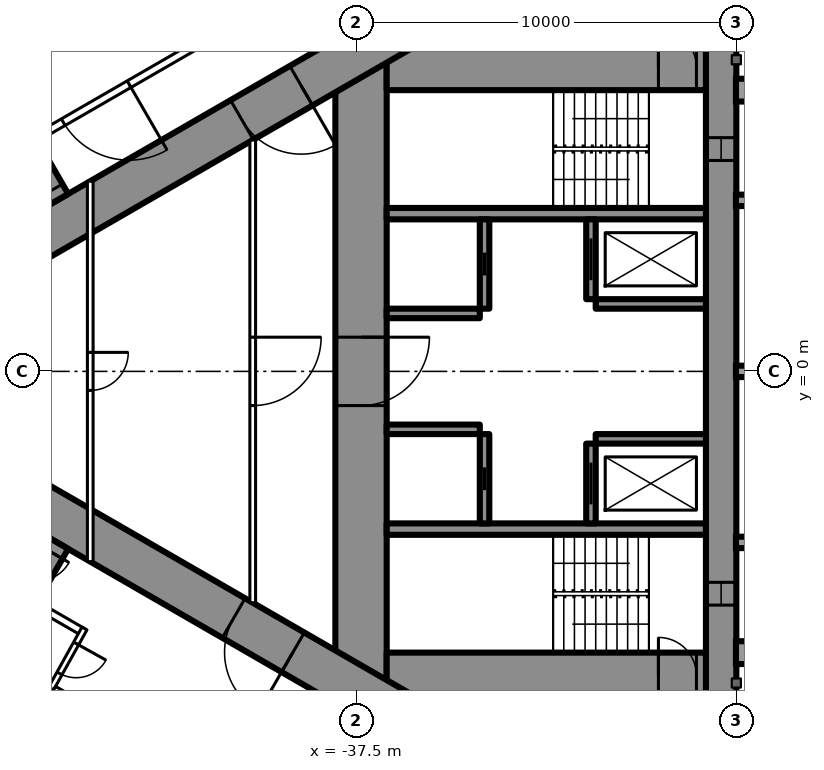
"""IFC4 building model, lengths in metres.
Left out: names, types, materials, properties, quantities, classifications, styles, units other than length and angle.
Written with IfcOpenShell. Run it as: python <this file> out.ifc"""

import sys

from ifc_helpers import new_model, si_unit, direction, frame, frame_2d, origin, place, context, subcontext, project, spatial, rectangle, extrude, element, fill, save


model = new_model("IFC4")
c1 = context("Model", 3, precision=1e-05, world=origin(), true_north=direction((0.0, 1.0)))
c2 = subcontext(c1, "Body", "Model", "MODEL_VIEW")
j1 = project(units=[si_unit("LENGTHUNIT", "METRE"), si_unit("PLANEANGLEUNIT", "RADIAN")], contexts=[c1])
p1 = place(None, origin())
s1 = spatial("IfcSite", under=j1, at=p1, CompositionType="ELEMENT")
p2 = place(p1, origin())
s2 = spatial("IfcBuilding", under=s1, at=p2, CompositionType="ELEMENT")
p3 = place(p2, frame((0.0, 0.0, 152.7)))
s3 = spatial("IfcBuildingStorey", under=s2, at=p3, CompositionType="ELEMENT", Elevation=152.7)
p4 = place(p3, frame((-27.9, 8.6, 0.0), z_axis=(0.0, 0.0, 1.0), x_axis=(0.0, -1.0, 0.0)))
e1 = element("IfcWall", 1, at=p4, inside=s3, PredefinedType="SHEAR", context=c2, shape_type="SweptSolid", body=[
    extrude(rectangle(XDim=17.2, YDim=0.8, at=frame_2d((8.6, 0.0))), origin(), (0.0, 0.0, 1.0), 3.6),
])
p5 = place(p4, frame((2.45, 0.0, 0.6)))
e2 = element("IfcOpeningElement", 2, at=p5, cuts=e1, PredefinedType="OPENING", context=c2, shape_type="SweptSolid", body=[
    extrude(rectangle(XDim=0.6, YDim=2.1, at=frame_2d((0.3, 1.05))), frame((0.0, 0.41, 0.0), z_axis=(0.0, -1.0, 0.0), x_axis=(1.0, 0.0, 0.0)), (0.0, 0.0, 1.0), 0.82),
])
p6 = place(p4, frame((14.15, 0.0, 0.6)))
e3 = element("IfcOpeningElement", 3, at=p6, cuts=e1, PredefinedType="OPENING", context=c2, shape_type="SweptSolid", body=[
    extrude(rectangle(XDim=0.6, YDim=2.1, at=frame_2d((0.3, 1.05))), frame((0.0, 0.41, 0.0), z_axis=(0.0, -1.0, 0.0), x_axis=(1.0, 0.0, 0.0)), (0.0, 0.0, 1.0), 0.82),
])
p7 = place(p3, frame((-37.375, 8.6, 0.0), z_axis=(0.0, 0.0, 1.0), x_axis=(0.0, -1.0, 0.0)))
e4 = element("IfcWall", 4, at=p7, inside=s3, PredefinedType="SHEAR", context=c2, shape_type="SweptSolid", body=[
    extrude(rectangle(XDim=17.2, YDim=1.35, at=frame_2d((8.6, 0.0))), origin(), (0.0, 0.0, 1.0), 3.6),
])
p8 = place(p7, frame((7.7, 0.0, 0.0)))
e5 = element("IfcOpeningElement", 5, at=p8, cuts=e4, PredefinedType="OPENING", context=c2, shape_type="SweptSolid", body=[
    extrude(rectangle(XDim=1.8, YDim=2.2, at=frame_2d((0.9, 1.1))), frame((0.0, 0.685, 0.0), z_axis=(0.0, -1.0, 0.0), x_axis=(1.0, 0.0, 0.0)), (0.0, 0.0, 1.0), 1.37),
])
p9 = place(p3, frame((-28.3, 8.0, 0.0), z_axis=(0.0, 0.0, 1.0), x_axis=(-1.0, 0.0, 0.0)))
e6 = element("IfcWall", 6, at=p9, inside=s3, PredefinedType="SHEAR", context=c2, shape_type="SweptSolid", body=[
    extrude(rectangle(XDim=8.4, YDim=1.2, at=frame_2d((4.2, 0.0))), origin(), (0.0, 0.0, 1.0), 3.6),
])
p10 = place(p9, frame((0.25, 0.0, 0.0)))
e7 = element("IfcOpeningElement", 7, at=p10, cuts=e6, PredefinedType="OPENING", context=c2, shape_type="SweptSolid", body=[
    extrude(rectangle(XDim=1.0, YDim=2.2, at=frame_2d((0.5, 1.1))), frame((0.0, 0.61, 0.0), z_axis=(0.0, -1.0, 0.0), x_axis=(1.0, 0.0, 0.0)), (0.0, 0.0, 1.0), 1.22),
])
p11 = place(p3, frame((-28.3, -8.0, 0.0), z_axis=(0.0, 0.0, 1.0), x_axis=(-1.0, 0.0, 0.0)))
e8 = element("IfcWall", 8, at=p11, inside=s3, PredefinedType="SHEAR", context=c2, shape_type="SweptSolid", body=[
    extrude(rectangle(XDim=8.4, YDim=1.2, at=frame_2d((4.2, 0.0))), origin(), (0.0, 0.0, 1.0), 3.6),
])
p12 = place(p11, frame((0.25, 0.0, 0.0)))
e9 = element("IfcOpeningElement", 9, at=p12, cuts=e8, PredefinedType="OPENING", context=c2, shape_type="SweptSolid", body=[
    extrude(rectangle(XDim=1.0, YDim=2.2, at=frame_2d((0.5, 1.1))), frame((0.0, 0.61, 0.0), z_axis=(0.0, -1.0, 0.0), x_axis=(1.0, 0.0, 0.0)), (0.0, 0.0, 1.0), 1.22),
])
for number, where, z_axis, x_axis in (
    (10, (-28.3, 4.15, 0.0), (0.0, 0.0, 1.0), (-1.0, 0.0, 0.0)),
    (11, (-28.3, -4.15, 0.0), (0.0, 0.0, 1.0), (-1.0, 0.0, 0.0)),
):
    element("IfcWall", number, at=place(p3, frame(where, z_axis=z_axis, x_axis=x_axis)), inside=s3, PredefinedType="SHEAR", context=c2, shape_type="SweptSolid", body=[
        extrude(rectangle(XDim=8.4, YDim=0.3, at=frame_2d((4.2, 0.0))), origin(), (0.0, 0.0, 1.0), 3.6),
    ])
p13 = place(p3, frame((-31.325, 4.0, 0.0), z_axis=(0.0, 0.0, 1.0), x_axis=(0.0, -1.0, 0.0)))
e12 = element("IfcWall", 12, at=p13, inside=s3, PredefinedType="SHEAR", context=c2, shape_type="SweptSolid", body=[
    extrude(rectangle(XDim=2.1, YDim=0.25, at=frame_2d((1.05, 0.0))), origin(), (0.0, 0.0, 1.0), 3.6),
])
p14 = place(p13, frame((0.5, 0.0, 0.0)))
e13 = element("IfcOpeningElement", 13, at=p14, cuts=e12, PredefinedType="OPENING", context=c2, shape_type="SweptSolid", body=[
    extrude(rectangle(XDim=1.1, YDim=2.2, at=frame_2d((0.55, 1.1))), frame((0.0, 0.135, 0.0), z_axis=(0.0, -1.0, 0.0), x_axis=(1.0, 0.0, 0.0)), (0.0, 0.0, 1.0), 0.27),
])
p15 = place(p3, frame((-34.125, 4.0, 0.0), z_axis=(0.0, 0.0, 1.0), x_axis=(0.0, -1.0, 0.0)))
e14 = element("IfcWall", 14, at=p15, inside=s3, PredefinedType="SHEAR", context=c2, shape_type="SweptSolid", body=[
    extrude(rectangle(XDim=2.35, YDim=0.25, at=frame_2d((1.175, 0.0))), origin(), (0.0, 0.0, 1.0), 3.6),
])
p16 = place(p15, frame((0.875, 0.0, 0.0)))
e15 = element("IfcOpeningElement", 15, at=p16, cuts=e14, PredefinedType="OPENING", context=c2, shape_type="SweptSolid", body=[
    extrude(rectangle(XDim=0.6, YDim=2.0, at=frame_2d((0.3, 1.0))), frame((0.0, 0.135, 0.0), z_axis=(0.0, -1.0, 0.0), x_axis=(1.0, 0.0, 0.0)), (0.0, 0.0, 1.0), 0.27),
])
p17 = place(p3, frame((-28.3, 1.775, 0.0), z_axis=(0.0, 0.0, 1.0), x_axis=(-1.0, 0.0, 0.0)))
e16 = element("IfcWall", 16, at=p17, inside=s3, PredefinedType="SHEAR", context=c2, shape_type="SweptSolid", body=[
    extrude(rectangle(XDim=2.9, YDim=0.25, at=frame_2d((1.45, 0.0))), origin(), (0.0, 0.0, 1.0), 3.6),
])
p18 = place(p3, frame((-34.25, 1.525, 0.0), z_axis=(0.0, 0.0, 1.0), x_axis=(-1.0, 0.0, 0.0)))
e17 = element("IfcWall", 17, at=p18, inside=s3, PredefinedType="SHEAR", context=c2, shape_type="SweptSolid", body=[
    extrude(rectangle(XDim=2.45, YDim=0.25, at=frame_2d((1.225, 0.0))), origin(), (0.0, 0.0, 1.0), 3.6),
])
p19 = place(p3, frame((-31.325, -1.9, 0.0), z_axis=(0.0, 0.0, 1.0), x_axis=(0.0, -1.0, 0.0)))
e18 = element("IfcWall", 18, at=p19, inside=s3, PredefinedType="SHEAR", context=c2, shape_type="SweptSolid", body=[
    extrude(rectangle(XDim=2.1, YDim=0.25, at=frame_2d((1.05, 0.0))), origin(), (0.0, 0.0, 1.0), 3.6),
])
p20 = place(p19, frame((0.5, 0.0, 0.0)))
e19 = element("IfcOpeningElement", 19, at=p20, cuts=e18, PredefinedType="OPENING", context=c2, shape_type="SweptSolid", body=[
    extrude(rectangle(XDim=1.1, YDim=2.2, at=frame_2d((0.55, 1.1))), frame((0.0, 0.135, 0.0), z_axis=(0.0, -1.0, 0.0), x_axis=(1.0, 0.0, 0.0)), (0.0, 0.0, 1.0), 0.27),
])
p21 = place(p3, frame((-34.125, -1.65, 0.0), z_axis=(0.0, 0.0, 1.0), x_axis=(0.0, -1.0, 0.0)))
e20 = element("IfcWall", 20, at=p21, inside=s3, PredefinedType="SHEAR", context=c2, shape_type="SweptSolid", body=[
    extrude(rectangle(XDim=2.35, YDim=0.25, at=frame_2d((1.175, 0.0))), origin(), (0.0, 0.0, 1.0), 3.6),
])
p22 = place(p21, frame((0.875, 0.0, 0.0)))
e21 = element("IfcOpeningElement", 21, at=p22, cuts=e20, PredefinedType="OPENING", context=c2, shape_type="SweptSolid", body=[
    extrude(rectangle(XDim=0.6, YDim=2.0, at=frame_2d((0.3, 1.0))), frame((0.0, 0.135, 0.0), z_axis=(0.0, -1.0, 0.0), x_axis=(1.0, 0.0, 0.0)), (0.0, 0.0, 1.0), 0.27),
])
p23 = place(p3, frame((-28.3, -1.775, 0.0), z_axis=(0.0, 0.0, 1.0), x_axis=(-1.0, 0.0, 0.0)))
e22 = element("IfcWall", 22, at=p23, inside=s3, PredefinedType="SHEAR", context=c2, shape_type="SweptSolid", body=[
    extrude(rectangle(XDim=2.9, YDim=0.25, at=frame_2d((1.45, 0.0))), origin(), (0.0, 0.0, 1.0), 3.6),
])
p24 = place(p3, frame((-34.25, -1.525, 0.0), z_axis=(0.0, 0.0, 1.0), x_axis=(-1.0, 0.0, 0.0)))
e23 = element("IfcWall", 23, at=p24, inside=s3, PredefinedType="SHEAR", context=c2, shape_type="SweptSolid", body=[
    extrude(rectangle(XDim=2.45, YDim=0.25, at=frame_2d((1.225, 0.0))), origin(), (0.0, 0.0, 1.0), 3.6),
])
p25 = place(p3, frame((-27.2, 14.3, 0.0), z_axis=(0.0, 0.0, 1.0), x_axis=(-0.866026593062, -0.499997940104, 0.0)))
e24 = element("IfcWall", 24, at=p25, inside=s3, PredefinedType="SHEAR", context=c2, shape_type="SweptSolid", body=[
    extrude(rectangle(XDim=28.946, YDim=1.2, at=frame_2d((14.473, 0.0))), origin(), (0.0, 0.0, 1.0), 3.6),
])
p26 = place(p25, frame((4.6, 0.0, 0.0)))
e25 = element("IfcOpeningElement", 25, at=p26, cuts=e24, PredefinedType="OPENING", context=c2, shape_type="SweptSolid", body=[
    extrude(rectangle(XDim=1.0, YDim=2.2, at=frame_2d((0.5, 1.1))), frame((0.0, 0.61, 0.0), z_axis=(0.0, -1.0, 0.0), x_axis=(1.0, 0.0, 0.0)), (0.0, 0.0, 1.0), 1.22),
])
p27 = place(p25, frame((13.568, 0.0, 0.0)))
e26 = element("IfcOpeningElement", 26, at=p27, cuts=e24, PredefinedType="OPENING", context=c2, shape_type="SweptSolid", body=[
    extrude(rectangle(XDim=1.8, YDim=2.04, at=frame_2d((0.9, 1.02))), frame((0.0, 0.61, 0.0), z_axis=(0.0, -1.0, 0.0), x_axis=(1.0, 0.0, 0.0)), (0.0, 0.0, 1.0), 1.22),
])
p28 = place(p3, frame((-27.2, -14.3, 0.0), z_axis=(0.0, 0.0, 1.0), x_axis=(-0.866024021859, 0.500002393557, 0.0)))
e27 = element("IfcWall", 27, at=p28, inside=s3, PredefinedType="SHEAR", context=c2, shape_type="SweptSolid", body=[
    extrude(rectangle(XDim=27.907, YDim=1.2, at=frame_2d((13.954, 0.0))), origin(), (0.0, 0.0, 1.0), 3.6),
])
p29 = place(p28, frame((4.6, 0.0, 0.0)))
e28 = element("IfcOpeningElement", 28, at=p29, cuts=e27, PredefinedType="OPENING", context=c2, shape_type="SweptSolid", body=[
    extrude(rectangle(XDim=1.0, YDim=2.2, at=frame_2d((0.5, 1.1))), frame((0.0, 0.61, 0.0), z_axis=(0.0, -1.0, 0.0), x_axis=(1.0, 0.0, 0.0)), (0.0, 0.0, 1.0), 1.22),
])
p30 = place(p28, frame((13.818, 0.0, 0.0)))
e29 = element("IfcOpeningElement", 29, at=p30, cuts=e27, PredefinedType="OPENING", context=c2, shape_type="SweptSolid", body=[
    extrude(rectangle(XDim=1.8, YDim=2.2, at=frame_2d((0.9, 1.1))), frame((0.0, 0.61, 0.0), z_axis=(0.0, -1.0, 0.0), x_axis=(1.0, 0.0, 0.0)), (0.0, 0.0, 1.0), 1.22),
])
p31 = place(p3, frame((-45.773, 4.27, 0.0), z_axis=(0.0, 0.0, 1.0), x_axis=(-0.499995723283, 0.866027872934, 0.0)))
e30 = element("IfcWall", 30, at=p31, inside=s3, PredefinedType="SHEAR", context=c2, shape_type="SweptSolid", body=[
    extrude(rectangle(XDim=10.131, YDim=1.6, at=frame_2d((5.065, 0.0))), origin(), (0.0, 0.0, 1.0), 3.6),
])
p32 = place(p31, frame((0.3, 0.0, 0.0)))
e31 = element("IfcOpeningElement", 31, at=p32, cuts=e30, PredefinedType="OPENING", context=c2, shape_type="SweptSolid", body=[
    extrude(rectangle(XDim=1.0, YDim=2.2, at=frame_2d((0.5, 1.1))), frame((0.0, 0.81, 0.0), z_axis=(0.0, -1.0, 0.0), x_axis=(1.0, 0.0, 0.0)), (0.0, 0.0, 1.0), 1.62),
])
p33 = place(p3, frame((-45.773, -4.27, 0.0), z_axis=(0.0, 0.0, 1.0), x_axis=(-0.499995723283, -0.866027872934, 0.0)))
e32 = element("IfcWall", 32, at=p33, inside=s3, PredefinedType="SHEAR", context=c2, shape_type="SweptSolid", body=[
    extrude(rectangle(XDim=10.131, YDim=1.6, at=frame_2d((5.065, 0.0))), origin(), (0.0, 0.0, 1.0), 3.6),
])
p34 = place(p33, frame((0.3, 0.0, 0.0)))
e33 = element("IfcOpeningElement", 33, at=p34, cuts=e32, PredefinedType="OPENING", context=c2, shape_type="SweptSolid", body=[
    extrude(rectangle(XDim=1.0, YDim=2.2, at=frame_2d((0.5, 1.1))), frame((0.0, 0.81, 0.0), z_axis=(0.0, -1.0, 0.0), x_axis=(1.0, 0.0, 0.0)), (0.0, 0.0, 1.0), 1.62),
])
p35 = place(p3, frame((-27.803, 16.608, 0.0), z_axis=(0.0, 0.0, 1.0), x_axis=(-0.866025851808, -0.499999223999, 0.0)))
e34 = element("IfcWall", 34, at=p35, inside=s3, PredefinedType="PARTITIONING", context=c2, shape_type="SweptSolid", body=[
    extrude(rectangle(XDim=33.215, YDim=0.2, at=frame_2d((16.608, 0.0))), origin(), (0.0, 0.0, 1.0), 3.35),
])
p36 = place(p35, frame((4.584, 0.0, 0.0)))
e35 = element("IfcOpeningElement", 35, at=p36, cuts=e34, PredefinedType="OPENING", context=c2, shape_type="SweptSolid", body=[
    extrude(rectangle(XDim=2.0, YDim=2.4, at=frame_2d((1.0, 1.2))), frame((0.0, 0.11, 0.0), z_axis=(0.0, -1.0, 0.0), x_axis=(1.0, 0.0, 0.0)), (0.0, 0.0, 1.0), 0.22),
])
p37 = place(p35, frame((18.1, 0.0, 0.0)))
e36 = element("IfcOpeningElement", 36, at=p37, cuts=e34, PredefinedType="OPENING", context=c2, shape_type="SweptSolid", body=[
    extrude(rectangle(XDim=2.0, YDim=2.4, at=frame_2d((1.0, 1.2))), frame((0.0, 0.11, 0.0), z_axis=(0.0, -1.0, 0.0), x_axis=(1.0, 0.0, 0.0)), (0.0, 0.0, 1.0), 0.22),
])
p38 = place(p35, frame((26.147, 0.0, 0.0)))
e37 = element("IfcOpeningElement", 37, at=p38, cuts=e34, PredefinedType="OPENING", context=c2, shape_type="SweptSolid", body=[
    extrude(rectangle(XDim=2.0, YDim=2.4, at=frame_2d((1.0, 1.2))), frame((0.0, 0.11, 0.0), z_axis=(0.0, -1.0, 0.0), x_axis=(1.0, 0.0, 0.0)), (0.0, 0.0, 1.0), 0.22),
])
p39 = place(p3, frame((-44.715, -6.844, 0.0), z_axis=(0.0, 0.0, 1.0), x_axis=(-0.866025261224, 0.500000246922, 0.0)))
e38 = element("IfcWall", 38, at=p39, inside=s3, PredefinedType="PARTITIONING", context=c2, shape_type="SweptSolid", body=[
    extrude(rectangle(XDim=13.567, YDim=0.2, at=frame_2d((6.783, 0.0))), origin(), (0.0, 0.0, 1.0), 3.35),
])
p40 = place(p39, frame((6.719, 0.0, 0.0)))
e39 = element("IfcOpeningElement", 39, at=p40, cuts=e38, PredefinedType="OPENING", context=c2, shape_type="SweptSolid", body=[
    extrude(rectangle(XDim=1.8, YDim=2.2, at=frame_2d((0.9, 1.1))), frame((0.0, 0.11, 0.0), z_axis=(0.0, -1.0, 0.0), x_axis=(1.0, 0.0, 0.0)), (0.0, 0.0, 1.0), 0.22),
])
p41 = place(p3, frame((-44.652, -6.764, 0.0), z_axis=(0.0, 0.0, 1.0), x_axis=(-0.485528096672, -0.8742210632, 0.0)))
e40 = element("IfcWall", 40, at=p41, inside=s3, PredefinedType="PARTITIONING", context=c2, shape_type="SweptSolid", body=[
    extrude(rectangle(XDim=1.805, YDim=0.15, at=frame_2d((0.903, 0.0))), origin(), (0.0, 0.0, 1.0), 3.35),
])
p42 = place(p41, frame((0.453, 0.0, 0.0)))
e41 = element("IfcOpeningElement", 41, at=p42, cuts=e40, PredefinedType="OPENING", context=c2, shape_type="SweptSolid", body=[
    extrude(rectangle(XDim=0.9, YDim=2.04, at=frame_2d((0.45, 1.02))), frame((0.0, 0.085, 0.0), z_axis=(0.0, -1.0, 0.0), x_axis=(1.0, 0.0, 0.0)), (0.0, 0.0, 1.0), 0.17),
])
p43 = place(p3, frame((-40.225, 6.087, 0.0), z_axis=(0.0, 0.0, 1.0), x_axis=(0.0, -1.0, 0.0)))
e42 = element("IfcWall", 42, at=p43, inside=s3, PredefinedType="PARTITIONING", context=c2, shape_type="SweptSolid", body=[
    extrude(rectangle(XDim=12.174, YDim=0.15, at=frame_2d((6.087, 0.0))), origin(), (0.0, 0.0, 1.0), 3.35),
])
p44 = place(p43, frame((5.187, 0.0, 0.0)))
e43 = element("IfcOpeningElement", 43, at=p44, cuts=e42, PredefinedType="OPENING", context=c2, shape_type="SweptSolid", body=[
    extrude(rectangle(XDim=1.8, YDim=2.2, at=frame_2d((0.9, 1.1))), frame((0.0, 0.085, 0.0), z_axis=(0.0, -1.0, 0.0), x_axis=(1.0, 0.0, 0.0)), (0.0, 0.0, 1.0), 0.17),
])
p45 = place(p3, frame((-44.5, 5.005, 0.0), z_axis=(0.0, 0.0, 1.0), x_axis=(0.0, -1.0, 0.0)))
e44 = element("IfcWall", 44, at=p45, inside=s3, PredefinedType="PARTITIONING", context=c2, shape_type="SweptSolid", body=[
    extrude(rectangle(XDim=10.009, YDim=0.15, at=frame_2d((5.005, 0.0))), origin(), (0.0, 0.0, 1.0), 3.35),
])
p46 = place(p45, frame((4.505, 0.0, 0.0)))
e45 = element("IfcOpeningElement", 45, at=p46, cuts=e44, PredefinedType="OPENING", context=c2, shape_type="SweptSolid", body=[
    extrude(rectangle(XDim=1.0, YDim=2.2, at=frame_2d((0.5, 1.1))), frame((0.0, 0.085, 0.0), z_axis=(0.0, -1.0, 0.0), x_axis=(1.0, 0.0, 0.0)), (0.0, 0.0, 1.0), 0.17),
])
p47 = place(p3, frame((-39.758, -11.697, 0.0), z_axis=(0.0, 0.0, 1.0), x_axis=(-0.866024194504, 0.500002094529, 0.0)))
e46 = element("IfcWall", 46, at=p47, inside=s3, PredefinedType="PARTITIONING", context=c2, shape_type="SweptSolid", body=[
    extrude(rectangle(XDim=6.6, YDim=0.25, at=frame_2d((3.3, 0.0))), origin(), (0.0, 0.0, 1.0), 3.35),
])
p48 = place(p37, origin())
e47 = element("IfcDoor", 47, at=p48, inside=s3, OperationType="DOUBLE_DOOR_SINGLE_SWING", PredefinedType="DOOR", context=c2, shape_type="SweptSolid", body=[
    extrude(rectangle(XDim=2.0, YDim=2.4, at=frame_2d((1.0, 1.2))), frame((0.0, 0.025, 0.0), z_axis=(0.0, -1.0, 0.0), x_axis=(1.0, 0.0, 0.0)), (0.0, 0.0, 1.0), 0.05),
])
fill(e36, e47)
p49 = place(p42, origin())
e48 = element("IfcDoor", 48, at=p49, inside=s3, OperationType="SINGLE_SWING_LEFT", PredefinedType="DOOR", context=c2, shape_type="SweptSolid", body=[
    extrude(rectangle(XDim=0.9, YDim=2.04, at=frame_2d((0.45, 1.02))), frame((0.0, 0.025, 0.0), z_axis=(0.0, -1.0, 0.0), x_axis=(1.0, 0.0, 0.0)), (0.0, 0.0, 1.0), 0.05),
])
fill(e41, e48)
p50 = place(p44, origin())
e49 = element("IfcDoor", 49, at=p50, inside=s3, OperationType="DOUBLE_DOOR_SINGLE_SWING", PredefinedType="DOOR", context=c2, shape_type="SweptSolid", body=[
    extrude(rectangle(XDim=1.8, YDim=2.2, at=frame_2d((0.9, 1.1))), frame((0.0, 0.025, 0.0), z_axis=(0.0, -1.0, 0.0), x_axis=(1.0, 0.0, 0.0)), (0.0, 0.0, 1.0), 0.05),
])
fill(e43, e49)
p51 = place(p46, origin())
e50 = element("IfcDoor", 50, at=p51, inside=s3, OperationType="SINGLE_SWING_LEFT", PredefinedType="DOOR", context=c2, shape_type="SweptSolid", body=[
    extrude(rectangle(XDim=1.0, YDim=2.2, at=frame_2d((0.5, 1.1))), frame((0.0, 0.025, 0.0), z_axis=(0.0, -1.0, 0.0), x_axis=(1.0, 0.0, 0.0)), (0.0, 0.0, 1.0), 0.05),
])
fill(e45, e50)
p52 = place(p27, origin())
e51 = element("IfcDoor", 51, at=p52, inside=s3, OperationType="DOUBLE_DOOR_SINGLE_SWING", PredefinedType="DOOR", context=c2, shape_type="SweptSolid", body=[
    extrude(rectangle(XDim=1.8, YDim=2.04, at=frame_2d((0.9, 1.02))), frame((0.0, 0.025, 0.0), z_axis=(0.0, -1.0, 0.0), x_axis=(1.0, 0.0, 0.0)), (0.0, 0.0, 1.0), 0.05),
])
fill(e26, e51)
p53 = place(p30, origin())
e52 = element("IfcDoor", 52, at=p53, inside=s3, OperationType="DOUBLE_DOOR_SINGLE_SWING", PredefinedType="DOOR", context=c2, shape_type="SweptSolid", body=[
    extrude(rectangle(XDim=1.8, YDim=2.2, at=frame_2d((0.9, 1.1))), frame((0.0, 0.025, 0.0), z_axis=(0.0, -1.0, 0.0), x_axis=(1.0, 0.0, 0.0)), (0.0, 0.0, 1.0), 0.05),
])
fill(e29, e52)
p54 = place(p8, origin())
e53 = element("IfcDoor", 53, at=p54, inside=s3, OperationType="DOUBLE_DOOR_SINGLE_SWING", PredefinedType="DOOR", context=c2, shape_type="SweptSolid", body=[
    extrude(rectangle(XDim=1.8, YDim=2.2, at=frame_2d((0.9, 1.1))), frame((0.0, 0.025, 0.0), z_axis=(0.0, -1.0, 0.0), x_axis=(1.0, 0.0, 0.0)), (0.0, 0.0, 1.0), 0.05),
])
fill(e5, e53)
p55 = place(p10, origin())
e54 = element("IfcDoor", 54, at=p55, inside=s3, OperationType="SINGLE_SWING_RIGHT", PredefinedType="DOOR", context=c2, shape_type="SweptSolid", body=[
    extrude(rectangle(XDim=1.0, YDim=2.2, at=frame_2d((0.5, 1.1))), frame((0.0, 0.025, 0.0), z_axis=(0.0, -1.0, 0.0), x_axis=(1.0, 0.0, 0.0)), (0.0, 0.0, 1.0), 0.05),
])
fill(e7, e54)
p56 = place(p12, origin())
e55 = element("IfcDoor", 55, at=p56, inside=s3, OperationType="SINGLE_SWING_RIGHT", PredefinedType="DOOR", context=c2, shape_type="SweptSolid", body=[
    extrude(rectangle(XDim=1.0, YDim=2.2, at=frame_2d((0.5, 1.1))), frame((0.0, 0.025, 0.0), z_axis=(0.0, -1.0, 0.0), x_axis=(1.0, 0.0, 0.0)), (0.0, 0.0, 1.0), 0.05),
])
fill(e9, e55)
p57 = place(p14, origin())
e56 = element("IfcDoor", 56, at=p57, inside=s3, OperationType="SLIDING_TO_LEFT", PredefinedType="USERDEFINED", context=c2, shape_type="SweptSolid", body=[
    extrude(rectangle(XDim=1.1, YDim=2.2, at=frame_2d((0.55, 1.1))), frame((0.0, 0.025, 0.0), z_axis=(0.0, -1.0, 0.0), x_axis=(1.0, 0.0, 0.0)), (0.0, 0.0, 1.0), 0.05),
])
fill(e13, e56)
p58 = place(p20, origin())
e57 = element("IfcDoor", 57, at=p58, inside=s3, OperationType="SLIDING_TO_LEFT", PredefinedType="USERDEFINED", context=c2, shape_type="SweptSolid", body=[
    extrude(rectangle(XDim=1.1, YDim=2.2, at=frame_2d((0.55, 1.1))), frame((0.0, 0.025, 0.0), z_axis=(0.0, -1.0, 0.0), x_axis=(1.0, 0.0, 0.0)), (0.0, 0.0, 1.0), 0.05),
])
fill(e19, e57)
p59 = place(p16, origin())
e58 = element("IfcDoor", 58, at=p59, inside=s3, OperationType="SLIDING_TO_LEFT", PredefinedType="DOOR", context=c2, shape_type="SweptSolid", body=[
    extrude(rectangle(XDim=0.6, YDim=2.0, at=frame_2d((0.3, 1.0))), frame((0.0, 0.025, 0.0), z_axis=(0.0, -1.0, 0.0), x_axis=(1.0, 0.0, 0.0)), (0.0, 0.0, 1.0), 0.05),
])
fill(e15, e58)
p60 = place(p22, origin())
e59 = element("IfcDoor", 59, at=p60, inside=s3, OperationType="SLIDING_TO_LEFT", PredefinedType="DOOR", context=c2, shape_type="SweptSolid", body=[
    extrude(rectangle(XDim=0.6, YDim=2.0, at=frame_2d((0.3, 1.0))), frame((0.0, 0.025, 0.0), z_axis=(0.0, -1.0, 0.0), x_axis=(1.0, 0.0, 0.0)), (0.0, 0.0, 1.0), 0.05),
])
fill(e21, e59)
p61 = place(p5, origin())
e60 = element("IfcWindow", 60, at=p61, inside=s3, PartitioningType="SINGLE_PANEL", PredefinedType="WINDOW", context=c2, shape_type="SweptSolid", body=[
    extrude(rectangle(XDim=0.6, YDim=2.1, at=frame_2d((0.3, 1.05))), frame((0.0, 0.03, 0.0), z_axis=(0.0, -1.0, 0.0), x_axis=(1.0, 0.0, 0.0)), (0.0, 0.0, 1.0), 0.06),
])
fill(e2, e60)
p62 = place(p6, origin())
e61 = element("IfcWindow", 61, at=p62, inside=s3, PartitioningType="SINGLE_PANEL", PredefinedType="WINDOW", context=c2, shape_type="SweptSolid", body=[
    extrude(rectangle(XDim=0.6, YDim=2.1, at=frame_2d((0.3, 1.05))), frame((0.0, 0.03, 0.0), z_axis=(0.0, -1.0, 0.0), x_axis=(1.0, 0.0, 0.0)), (0.0, 0.0, 1.0), 0.06),
])
fill(e3, e61)
save(model, sys.argv[1])
